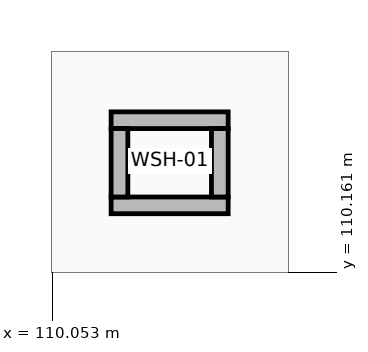
"""IFC4 building model, lengths in metres.
Left out: names, types, materials, properties, quantities, classifications, styles, units other than length and angle.
Written with IfcOpenShell. Run it as: python <this file> out.ifc"""

import sys

from ifc_helpers import new_model, si_unit, direction, frame, frame_2d, origin, place, context, subcontext, project, spatial, rectangle, extrude, element, save


model = new_model("IFC4")
c1 = context("Model", 3, precision=1e-05, world=origin(), true_north=direction((0.0, 1.0)))
c2 = subcontext(c1, "Body", "Model", "MODEL_VIEW")
j1 = project(units=[si_unit("LENGTHUNIT", "METRE"), si_unit("PLANEANGLEUNIT", "RADIAN")], contexts=[c1])
p1 = place(None, origin())
s1 = spatial("IfcSite", under=j1, at=p1, CompositionType="ELEMENT")
p2 = place(p1, origin())
s2 = spatial("IfcBuilding", under=s1, at=p2, CompositionType="ELEMENT")
p3 = place(p2, frame((0.0, 0.0, 27.0)))
s3 = spatial("IfcBuildingStorey", under=s2, at=p3, CompositionType="ELEMENT", Elevation=27.0)
for number, where, z_axis, x_axis in (
    (1, (110.83, 111.04, 0.0), (0.0, 0.0, 1.0), (1.0, 0.0, 0.0)),
    (2, (110.83, 112.16, 0.0), (0.0, 0.0, 1.0), (1.0, 0.0, 0.0)),
):
    element("IfcWall", number, at=place(p3, frame(where, z_axis=z_axis, x_axis=x_axis)), inside=s3, PredefinedType="STANDARD", context=c2, shape_type="SweptSolid", body=[
        extrude(rectangle(XDim=1.54, YDim=0.22, at=frame_2d((0.77, 0.0))), origin(), (0.0, 0.0, 1.0), 2.96),
    ])
for number, where, z_axis, x_axis in (
    (3, (110.94, 111.15, 0.0), (0.0, 0.0, 1.0), (0.0, 1.0, 0.0)),
    (4, (112.26, 111.15, 0.0), (0.0, 0.0, 1.0), (0.0, 1.0, 0.0)),
):
    element("IfcWall", number, at=place(p3, frame(where, z_axis=z_axis, x_axis=x_axis)), inside=s3, PredefinedType="STANDARD", context=c2, shape_type="SweptSolid", body=[
        extrude(rectangle(XDim=0.9, YDim=0.22, at=frame_2d((0.45, 0.0))), origin(), (0.0, 0.0, 1.0), 2.96),
    ])
save(model, sys.argv[1])
